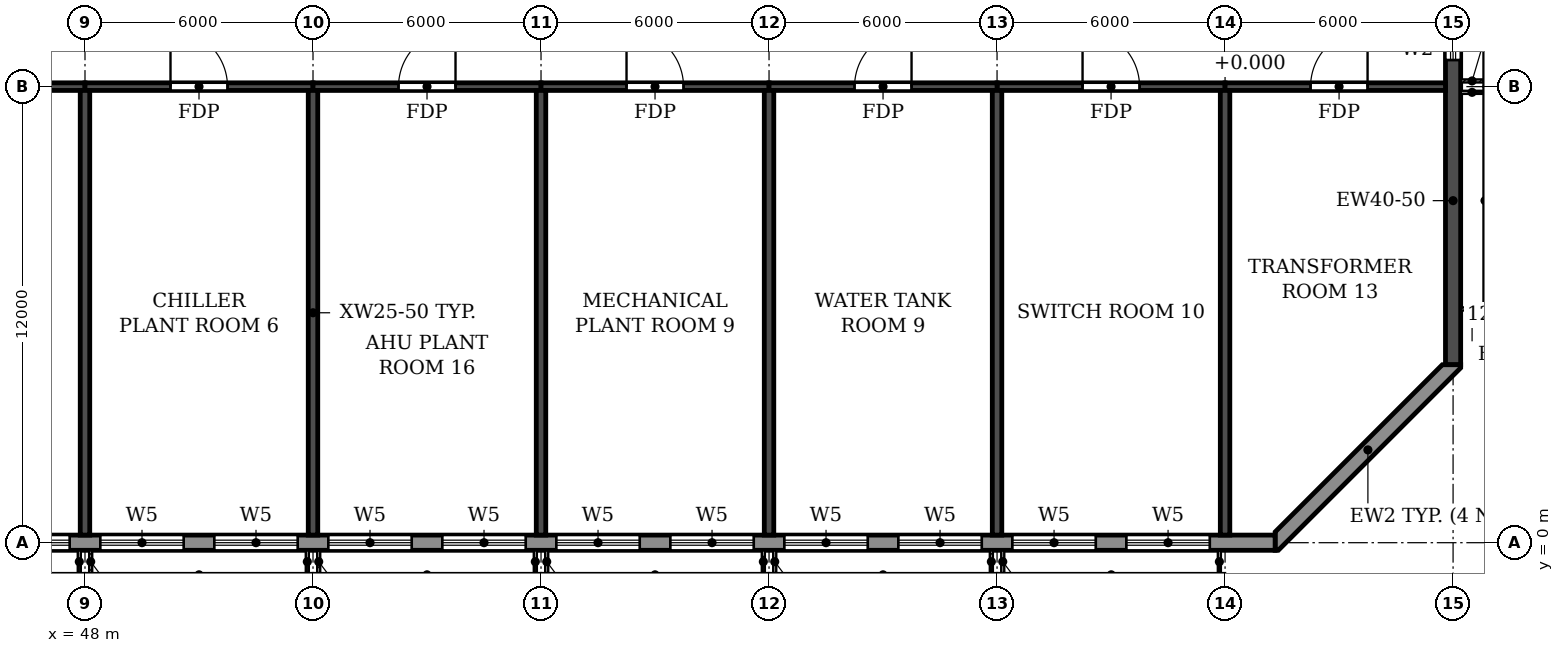
"""IFC4 building model, lengths in metres.
Left out: names, types, materials, properties, quantities, classifications, styles, units other than length and angle.
Written with IfcOpenShell. Run it as: python <this file> out.ifc"""

import sys

from ifc_helpers import new_model, si_unit, direction, frame, frame_2d, origin, place, context, subcontext, project, spatial, polyline, rectangle, outline, extrude, element, fill, save


model = new_model("IFC4")
c1 = context("Model", 3, precision=1e-05, world=origin(), true_north=direction((0.0, 1.0)))
c2 = subcontext(c1, "Body", "Model", "MODEL_VIEW")
j1 = project(units=[si_unit("LENGTHUNIT", "METRE"), si_unit("PLANEANGLEUNIT", "RADIAN")], contexts=[c1])
p1 = place(None, origin())
s1 = spatial("IfcSite", under=j1, at=p1, CompositionType="ELEMENT")
p2 = place(p1, origin())
s2 = spatial("IfcBuilding", under=s1, at=p2, CompositionType="ELEMENT")
p3 = place(p2, frame((0.0, 0.0, 267.0)))
s3 = spatial("IfcBuildingStorey", under=s2, at=p3, CompositionType="ELEMENT", Elevation=267.0)
for number, where, z_axis, x_axis in (
    (1, (48.0, 0.2, 0.0), (0.0, 0.0, 1.0), (0.0, 1.0, 0.0)),
    (2, (54.0, 0.2, 0.0), (0.0, 0.0, 1.0), (0.0, 1.0, 0.0)),
    (3, (60.0, 0.2, 0.0), (0.0, 0.0, 1.0), (0.0, 1.0, 0.0)),
    (4, (66.0, 0.2, 0.0), (0.0, 0.0, 1.0), (0.0, 1.0, 0.0)),
    (5, (72.0, 0.2, 0.0), (0.0, 0.0, 1.0), (0.0, 1.0, 0.0)),
    (6, (78.0, 0.2, 0.0), (0.0, 0.0, 1.0), (0.0, 1.0, 0.0)),
):
    element("IfcWall", number, at=place(p3, frame(where, z_axis=z_axis, x_axis=x_axis)), inside=s3, PredefinedType="SHEAR", context=c2, shape_type="SweptSolid", body=[
        extrude(rectangle(XDim=11.7, YDim=0.25, at=frame_2d((5.85, 0.0))), origin(), (0.0, 0.0, 1.0), 5.15),
    ])
p4 = place(p3, frame((84.0, 4.683, 0.0), z_axis=(0.0, 0.0, 1.0), x_axis=(0.0, 1.0, 0.0)))
e7 = element("IfcWall", 7, at=p4, inside=s3, PredefinedType="SHEAR", context=c2, shape_type="SweptSolid", body=[
    extrude(rectangle(XDim=31.834, YDim=0.4, at=frame_2d((15.917, 0.0))), origin(), (0.0, 0.0, 1.0), 5.15),
])
p5 = place(p4, frame((23.817, 0.0, 0.9)))
e8 = element("IfcOpeningElement", 8, at=p5, cuts=e7, PredefinedType="OPENING", context=c2, shape_type="SweptSolid", body=[
    extrude(rectangle(XDim=1.2, YDim=1.5, at=frame_2d((0.6, 0.75))), frame((0.0, 0.21, 0.0), z_axis=(0.0, -1.0, 0.0), x_axis=(1.0, 0.0, 0.0)), (0.0, 0.0, 1.0), 0.42),
])
p6 = place(p4, frame((8.017, 0.0, 0.9)))
e9 = element("IfcOpeningElement", 9, at=p6, cuts=e7, PredefinedType="OPENING", context=c2, shape_type="SweptSolid", body=[
    extrude(rectangle(XDim=1.2, YDim=1.5, at=frame_2d((0.6, 0.75))), frame((0.0, 0.21, 0.0), z_axis=(0.0, -1.0, 0.0), x_axis=(1.0, 0.0, 0.0)), (0.0, 0.0, 1.0), 0.42),
])
p7 = place(p4, frame((15.917, 0.0, 0.9)))
e10 = element("IfcOpeningElement", 10, at=p7, cuts=e7, PredefinedType="OPENING", context=c2, shape_type="SweptSolid", body=[
    extrude(rectangle(XDim=1.2, YDim=1.5, at=frame_2d((0.6, 0.75))), frame((0.0, 0.21, 0.0), z_axis=(0.0, -1.0, 0.0), x_axis=(1.0, 0.0, 0.0)), (0.0, 0.0, 1.0), 0.42),
])
p8 = place(p3, frame((42.0, 12.0, 0.0), z_axis=(0.0, 0.0, 1.0), x_axis=(1.0, 0.0, 0.0)))
e11 = element("IfcWall", 11, at=p8, inside=s3, PredefinedType="SHEAR", context=c2, shape_type="SweptSolid", body=[
    extrude(rectangle(XDim=6.0, YDim=0.2, at=frame_2d((3.0, 0.0))), origin(), (0.0, 0.0, 1.0), 4.55),
])
p9 = place(p8, frame((2.25, 0.0, 0.0)))
e12 = element("IfcOpeningElement", 12, at=p9, cuts=e11, PredefinedType="OPENING", context=c2, shape_type="SweptSolid", body=[
    extrude(rectangle(XDim=1.5, YDim=2.1, at=frame_2d((0.75, 1.05))), frame((0.0, 0.11, 0.0), z_axis=(0.0, -1.0, 0.0), x_axis=(1.0, 0.0, 0.0)), (0.0, 0.0, 1.0), 0.22),
])
p10 = place(p3, frame((48.0, 12.0, 0.0), z_axis=(0.0, 0.0, 1.0), x_axis=(1.0, 0.0, 0.0)))
e13 = element("IfcWall", 13, at=p10, inside=s3, PredefinedType="SHEAR", context=c2, shape_type="SweptSolid", body=[
    extrude(rectangle(XDim=6.0, YDim=0.2, at=frame_2d((3.0, 0.0))), origin(), (0.0, 0.0, 1.0), 4.55),
])
p11 = place(p10, frame((2.25, 0.0, 0.0)))
e14 = element("IfcOpeningElement", 14, at=p11, cuts=e13, PredefinedType="OPENING", context=c2, shape_type="SweptSolid", body=[
    extrude(rectangle(XDim=1.5, YDim=2.1, at=frame_2d((0.75, 1.05))), frame((0.0, 0.11, 0.0), z_axis=(0.0, -1.0, 0.0), x_axis=(1.0, 0.0, 0.0)), (0.0, 0.0, 1.0), 0.22),
])
p12 = place(p3, frame((54.0, 12.0, 0.0), z_axis=(0.0, 0.0, 1.0), x_axis=(1.0, 0.0, 0.0)))
e15 = element("IfcWall", 15, at=p12, inside=s3, PredefinedType="SHEAR", context=c2, shape_type="SweptSolid", body=[
    extrude(rectangle(XDim=6.0, YDim=0.2, at=frame_2d((3.0, 0.0))), origin(), (0.0, 0.0, 1.0), 4.55),
])
p13 = place(p12, frame((2.25, 0.0, 0.0)))
e16 = element("IfcOpeningElement", 16, at=p13, cuts=e15, PredefinedType="OPENING", context=c2, shape_type="SweptSolid", body=[
    extrude(rectangle(XDim=1.5, YDim=2.1, at=frame_2d((0.75, 1.05))), frame((0.0, 0.11, 0.0), z_axis=(0.0, -1.0, 0.0), x_axis=(1.0, 0.0, 0.0)), (0.0, 0.0, 1.0), 0.22),
])
p14 = place(p3, frame((60.0, 12.0, 0.0), z_axis=(0.0, 0.0, 1.0), x_axis=(1.0, 0.0, 0.0)))
e17 = element("IfcWall", 17, at=p14, inside=s3, PredefinedType="SHEAR", context=c2, shape_type="SweptSolid", body=[
    extrude(rectangle(XDim=6.0, YDim=0.2, at=frame_2d((3.0, 0.0))), origin(), (0.0, 0.0, 1.0), 4.55),
])
p15 = place(p14, frame((2.25, 0.0, 0.0)))
e18 = element("IfcOpeningElement", 18, at=p15, cuts=e17, PredefinedType="OPENING", context=c2, shape_type="SweptSolid", body=[
    extrude(rectangle(XDim=1.5, YDim=2.1, at=frame_2d((0.75, 1.05))), frame((0.0, 0.11, 0.0), z_axis=(0.0, -1.0, 0.0), x_axis=(1.0, 0.0, 0.0)), (0.0, 0.0, 1.0), 0.22),
])
p16 = place(p3, frame((66.0, 12.0, 0.0), z_axis=(0.0, 0.0, 1.0), x_axis=(1.0, 0.0, 0.0)))
e19 = element("IfcWall", 19, at=p16, inside=s3, PredefinedType="SHEAR", context=c2, shape_type="SweptSolid", body=[
    extrude(rectangle(XDim=6.0, YDim=0.2, at=frame_2d((3.0, 0.0))), origin(), (0.0, 0.0, 1.0), 4.55),
])
p17 = place(p16, frame((2.25, 0.0, 0.0)))
e20 = element("IfcOpeningElement", 20, at=p17, cuts=e19, PredefinedType="OPENING", context=c2, shape_type="SweptSolid", body=[
    extrude(rectangle(XDim=1.5, YDim=2.1, at=frame_2d((0.75, 1.05))), frame((0.0, 0.11, 0.0), z_axis=(0.0, -1.0, 0.0), x_axis=(1.0, 0.0, 0.0)), (0.0, 0.0, 1.0), 0.22),
])
p18 = place(p3, frame((72.0, 12.0, 0.0), z_axis=(0.0, 0.0, 1.0), x_axis=(1.0, 0.0, 0.0)))
e21 = element("IfcWall", 21, at=p18, inside=s3, PredefinedType="SHEAR", context=c2, shape_type="SweptSolid", body=[
    extrude(rectangle(XDim=6.0, YDim=0.2, at=frame_2d((3.0, 0.0))), origin(), (0.0, 0.0, 1.0), 4.55),
])
p19 = place(p18, frame((2.25, 0.0, 0.0)))
e22 = element("IfcOpeningElement", 22, at=p19, cuts=e21, PredefinedType="OPENING", context=c2, shape_type="SweptSolid", body=[
    extrude(rectangle(XDim=1.5, YDim=2.1, at=frame_2d((0.75, 1.05))), frame((0.0, 0.11, 0.0), z_axis=(0.0, -1.0, 0.0), x_axis=(1.0, 0.0, 0.0)), (0.0, 0.0, 1.0), 0.22),
])
p20 = place(p3, frame((78.0, 12.0, 0.0), z_axis=(0.0, 0.0, 1.0), x_axis=(1.0, 0.0, 0.0)))
e23 = element("IfcWall", 23, at=p20, inside=s3, PredefinedType="SHEAR", context=c2, shape_type="SweptSolid", body=[
    extrude(rectangle(XDim=5.8, YDim=0.2, at=frame_2d((2.9, 0.0))), origin(), (0.0, 0.0, 1.0), 4.55),
])
p21 = place(p20, frame((2.25, 0.0, 0.0)))
e24 = element("IfcOpeningElement", 24, at=p21, cuts=e23, PredefinedType="OPENING", context=c2, shape_type="SweptSolid", body=[
    extrude(rectangle(XDim=1.5, YDim=2.1, at=frame_2d((0.75, 1.05))), frame((0.0, 0.11, 0.0), z_axis=(0.0, -1.0, 0.0), x_axis=(1.0, 0.0, 0.0)), (0.0, 0.0, 1.0), 0.22),
])
p22 = place(p3, frame((22.683, 0.0, 0.0), z_axis=(0.0, 0.0, 1.0), x_axis=(1.0, 0.0, 0.0)))
e25 = element("IfcWall", 25, at=p22, inside=s3, PredefinedType="STANDARD", context=c2, shape_type="SweptSolid", body=[
    extrude(rectangle(XDim=56.634, YDim=0.4, at=frame_2d((28.317, 0.0))), origin(), (0.0, 0.0, 1.0), 5.15),
])
p23 = place(p22, frame((1.717, 0.0, 0.6)))
e26 = element("IfcOpeningElement", 26, at=p23, cuts=e25, PredefinedType="OPENING", context=c2, shape_type="SweptSolid", body=[
    extrude(rectangle(XDim=2.2, YDim=2.4, at=frame_2d((1.1, 1.2))), frame((0.0, 0.21, 0.0), z_axis=(0.0, -1.0, 0.0), x_axis=(1.0, 0.0, 0.0)), (0.0, 0.0, 1.0), 0.42),
])
p24 = place(p22, frame((4.717, 0.0, 0.6)))
e27 = element("IfcOpeningElement", 27, at=p24, cuts=e25, PredefinedType="OPENING", context=c2, shape_type="SweptSolid", body=[
    extrude(rectangle(XDim=2.2, YDim=2.4, at=frame_2d((1.1, 1.2))), frame((0.0, 0.21, 0.0), z_axis=(0.0, -1.0, 0.0), x_axis=(1.0, 0.0, 0.0)), (0.0, 0.0, 1.0), 0.42),
])
p25 = place(p22, frame((7.717, 0.0, 0.6)))
e28 = element("IfcOpeningElement", 28, at=p25, cuts=e25, PredefinedType="OPENING", context=c2, shape_type="SweptSolid", body=[
    extrude(rectangle(XDim=2.2, YDim=2.4, at=frame_2d((1.1, 1.2))), frame((0.0, 0.21, 0.0), z_axis=(0.0, -1.0, 0.0), x_axis=(1.0, 0.0, 0.0)), (0.0, 0.0, 1.0), 0.42),
])
p26 = place(p22, frame((10.717, 0.0, 0.6)))
e29 = element("IfcOpeningElement", 29, at=p26, cuts=e25, PredefinedType="OPENING", context=c2, shape_type="SweptSolid", body=[
    extrude(rectangle(XDim=2.2, YDim=2.4, at=frame_2d((1.1, 1.2))), frame((0.0, 0.21, 0.0), z_axis=(0.0, -1.0, 0.0), x_axis=(1.0, 0.0, 0.0)), (0.0, 0.0, 1.0), 0.42),
])
p27 = place(p22, frame((13.717, 0.0, 0.6)))
e30 = element("IfcOpeningElement", 30, at=p27, cuts=e25, PredefinedType="OPENING", context=c2, shape_type="SweptSolid", body=[
    extrude(rectangle(XDim=2.2, YDim=2.4, at=frame_2d((1.1, 1.2))), frame((0.0, 0.21, 0.0), z_axis=(0.0, -1.0, 0.0), x_axis=(1.0, 0.0, 0.0)), (0.0, 0.0, 1.0), 0.42),
])
p28 = place(p22, frame((16.717, 0.0, 0.6)))
e31 = element("IfcOpeningElement", 31, at=p28, cuts=e25, PredefinedType="OPENING", context=c2, shape_type="SweptSolid", body=[
    extrude(rectangle(XDim=2.2, YDim=2.4, at=frame_2d((1.1, 1.2))), frame((0.0, 0.21, 0.0), z_axis=(0.0, -1.0, 0.0), x_axis=(1.0, 0.0, 0.0)), (0.0, 0.0, 1.0), 0.42),
])
p29 = place(p22, frame((19.717, 0.0, 0.6)))
e32 = element("IfcOpeningElement", 32, at=p29, cuts=e25, PredefinedType="OPENING", context=c2, shape_type="SweptSolid", body=[
    extrude(rectangle(XDim=2.2, YDim=2.4, at=frame_2d((1.1, 1.2))), frame((0.0, 0.21, 0.0), z_axis=(0.0, -1.0, 0.0), x_axis=(1.0, 0.0, 0.0)), (0.0, 0.0, 1.0), 0.42),
])
p30 = place(p22, frame((22.717, 0.0, 0.6)))
e33 = element("IfcOpeningElement", 33, at=p30, cuts=e25, PredefinedType="OPENING", context=c2, shape_type="SweptSolid", body=[
    extrude(rectangle(XDim=2.2, YDim=2.4, at=frame_2d((1.1, 1.2))), frame((0.0, 0.21, 0.0), z_axis=(0.0, -1.0, 0.0), x_axis=(1.0, 0.0, 0.0)), (0.0, 0.0, 1.0), 0.42),
])
p31 = place(p22, frame((25.717, 0.0, 0.6)))
e34 = element("IfcOpeningElement", 34, at=p31, cuts=e25, PredefinedType="OPENING", context=c2, shape_type="SweptSolid", body=[
    extrude(rectangle(XDim=2.2, YDim=2.4, at=frame_2d((1.1, 1.2))), frame((0.0, 0.21, 0.0), z_axis=(0.0, -1.0, 0.0), x_axis=(1.0, 0.0, 0.0)), (0.0, 0.0, 1.0), 0.42),
])
p32 = place(p22, frame((28.717, 0.0, 0.6)))
e35 = element("IfcOpeningElement", 35, at=p32, cuts=e25, PredefinedType="OPENING", context=c2, shape_type="SweptSolid", body=[
    extrude(rectangle(XDim=2.2, YDim=2.4, at=frame_2d((1.1, 1.2))), frame((0.0, 0.21, 0.0), z_axis=(0.0, -1.0, 0.0), x_axis=(1.0, 0.0, 0.0)), (0.0, 0.0, 1.0), 0.42),
])
p33 = place(p22, frame((31.717, 0.0, 0.6)))
e36 = element("IfcOpeningElement", 36, at=p33, cuts=e25, PredefinedType="OPENING", context=c2, shape_type="SweptSolid", body=[
    extrude(rectangle(XDim=2.2, YDim=2.4, at=frame_2d((1.1, 1.2))), frame((0.0, 0.21, 0.0), z_axis=(0.0, -1.0, 0.0), x_axis=(1.0, 0.0, 0.0)), (0.0, 0.0, 1.0), 0.42),
])
p34 = place(p22, frame((34.717, 0.0, 0.6)))
e37 = element("IfcOpeningElement", 37, at=p34, cuts=e25, PredefinedType="OPENING", context=c2, shape_type="SweptSolid", body=[
    extrude(rectangle(XDim=2.2, YDim=2.4, at=frame_2d((1.1, 1.2))), frame((0.0, 0.21, 0.0), z_axis=(0.0, -1.0, 0.0), x_axis=(1.0, 0.0, 0.0)), (0.0, 0.0, 1.0), 0.42),
])
p35 = place(p22, frame((37.717, 0.0, 0.6)))
e38 = element("IfcOpeningElement", 38, at=p35, cuts=e25, PredefinedType="OPENING", context=c2, shape_type="SweptSolid", body=[
    extrude(rectangle(XDim=2.2, YDim=2.4, at=frame_2d((1.1, 1.2))), frame((0.0, 0.21, 0.0), z_axis=(0.0, -1.0, 0.0), x_axis=(1.0, 0.0, 0.0)), (0.0, 0.0, 1.0), 0.42),
])
p36 = place(p22, frame((40.717, 0.0, 0.6)))
e39 = element("IfcOpeningElement", 39, at=p36, cuts=e25, PredefinedType="OPENING", context=c2, shape_type="SweptSolid", body=[
    extrude(rectangle(XDim=2.2, YDim=2.4, at=frame_2d((1.1, 1.2))), frame((0.0, 0.21, 0.0), z_axis=(0.0, -1.0, 0.0), x_axis=(1.0, 0.0, 0.0)), (0.0, 0.0, 1.0), 0.42),
])
p37 = place(p22, frame((43.717, 0.0, 0.6)))
e40 = element("IfcOpeningElement", 40, at=p37, cuts=e25, PredefinedType="OPENING", context=c2, shape_type="SweptSolid", body=[
    extrude(rectangle(XDim=2.2, YDim=2.4, at=frame_2d((1.1, 1.2))), frame((0.0, 0.21, 0.0), z_axis=(0.0, -1.0, 0.0), x_axis=(1.0, 0.0, 0.0)), (0.0, 0.0, 1.0), 0.42),
])
p38 = place(p22, frame((46.717, 0.0, 0.6)))
e41 = element("IfcOpeningElement", 41, at=p38, cuts=e25, PredefinedType="OPENING", context=c2, shape_type="SweptSolid", body=[
    extrude(rectangle(XDim=2.2, YDim=2.4, at=frame_2d((1.1, 1.2))), frame((0.0, 0.21, 0.0), z_axis=(0.0, -1.0, 0.0), x_axis=(1.0, 0.0, 0.0)), (0.0, 0.0, 1.0), 0.42),
])
p39 = place(p22, frame((49.717, 0.0, 0.6)))
e42 = element("IfcOpeningElement", 42, at=p39, cuts=e25, PredefinedType="OPENING", context=c2, shape_type="SweptSolid", body=[
    extrude(rectangle(XDim=2.2, YDim=2.4, at=frame_2d((1.1, 1.2))), frame((0.0, 0.21, 0.0), z_axis=(0.0, -1.0, 0.0), x_axis=(1.0, 0.0, 0.0)), (0.0, 0.0, 1.0), 0.42),
])
p40 = place(p22, frame((52.717, 0.0, 0.6)))
e43 = element("IfcOpeningElement", 43, at=p40, cuts=e25, PredefinedType="OPENING", context=c2, shape_type="SweptSolid", body=[
    extrude(rectangle(XDim=2.2, YDim=2.4, at=frame_2d((1.1, 1.2))), frame((0.0, 0.21, 0.0), z_axis=(0.0, -1.0, 0.0), x_axis=(1.0, 0.0, 0.0)), (0.0, 0.0, 1.0), 0.42),
])
p41 = place(p3, origin())
e44 = element("IfcWall", 44, at=p41, inside=s3, PredefinedType="STANDARD", context=c2, shape_type="SweptSolid", body=[
    extrude(outline(polyline([(79.317, -0.2), (79.4, -0.2), (84.2, 4.6), (84.2, 4.683), (83.717, 4.683), (79.317, 0.283), (79.317, -0.2)])), origin(), (0.0, 0.0, 1.0), 5.15),
])
p42 = place(p30, origin())
e45 = element("IfcWindow", 45, at=p42, inside=s3, PartitioningType="TRIPLE_PANEL_HORIZONTAL", PredefinedType="WINDOW", context=c2, shape_type="SweptSolid", body=[
    extrude(rectangle(XDim=2.2, YDim=2.4, at=frame_2d((1.1, 1.2))), frame((0.0, 0.03, 0.0), z_axis=(0.0, -1.0, 0.0), x_axis=(1.0, 0.0, 0.0)), (0.0, 0.0, 1.0), 0.06),
])
fill(e33, e45)
p43 = place(p31, origin())
e46 = element("IfcWindow", 46, at=p43, inside=s3, PartitioningType="TRIPLE_PANEL_HORIZONTAL", PredefinedType="WINDOW", context=c2, shape_type="SweptSolid", body=[
    extrude(rectangle(XDim=2.2, YDim=2.4, at=frame_2d((1.1, 1.2))), frame((0.0, 0.03, 0.0), z_axis=(0.0, -1.0, 0.0), x_axis=(1.0, 0.0, 0.0)), (0.0, 0.0, 1.0), 0.06),
])
fill(e34, e46)
p44 = place(p32, origin())
e47 = element("IfcWindow", 47, at=p44, inside=s3, PartitioningType="TRIPLE_PANEL_HORIZONTAL", PredefinedType="WINDOW", context=c2, shape_type="SweptSolid", body=[
    extrude(rectangle(XDim=2.2, YDim=2.4, at=frame_2d((1.1, 1.2))), frame((0.0, 0.03, 0.0), z_axis=(0.0, -1.0, 0.0), x_axis=(1.0, 0.0, 0.0)), (0.0, 0.0, 1.0), 0.06),
])
fill(e35, e47)
p45 = place(p33, origin())
e48 = element("IfcWindow", 48, at=p45, inside=s3, PartitioningType="TRIPLE_PANEL_HORIZONTAL", PredefinedType="WINDOW", context=c2, shape_type="SweptSolid", body=[
    extrude(rectangle(XDim=2.2, YDim=2.4, at=frame_2d((1.1, 1.2))), frame((0.0, 0.03, 0.0), z_axis=(0.0, -1.0, 0.0), x_axis=(1.0, 0.0, 0.0)), (0.0, 0.0, 1.0), 0.06),
])
fill(e36, e48)
p46 = place(p34, origin())
e49 = element("IfcWindow", 49, at=p46, inside=s3, PartitioningType="TRIPLE_PANEL_HORIZONTAL", PredefinedType="WINDOW", context=c2, shape_type="SweptSolid", body=[
    extrude(rectangle(XDim=2.2, YDim=2.4, at=frame_2d((1.1, 1.2))), frame((0.0, 0.03, 0.0), z_axis=(0.0, -1.0, 0.0), x_axis=(1.0, 0.0, 0.0)), (0.0, 0.0, 1.0), 0.06),
])
fill(e37, e49)
p47 = place(p35, origin())
e50 = element("IfcWindow", 50, at=p47, inside=s3, PartitioningType="TRIPLE_PANEL_HORIZONTAL", PredefinedType="WINDOW", context=c2, shape_type="SweptSolid", body=[
    extrude(rectangle(XDim=2.2, YDim=2.4, at=frame_2d((1.1, 1.2))), frame((0.0, 0.03, 0.0), z_axis=(0.0, -1.0, 0.0), x_axis=(1.0, 0.0, 0.0)), (0.0, 0.0, 1.0), 0.06),
])
fill(e38, e50)
p48 = place(p36, origin())
e51 = element("IfcWindow", 51, at=p48, inside=s3, PartitioningType="TRIPLE_PANEL_HORIZONTAL", PredefinedType="WINDOW", context=c2, shape_type="SweptSolid", body=[
    extrude(rectangle(XDim=2.2, YDim=2.4, at=frame_2d((1.1, 1.2))), frame((0.0, 0.03, 0.0), z_axis=(0.0, -1.0, 0.0), x_axis=(1.0, 0.0, 0.0)), (0.0, 0.0, 1.0), 0.06),
])
fill(e39, e51)
p49 = place(p37, origin())
e52 = element("IfcWindow", 52, at=p49, inside=s3, PartitioningType="TRIPLE_PANEL_HORIZONTAL", PredefinedType="WINDOW", context=c2, shape_type="SweptSolid", body=[
    extrude(rectangle(XDim=2.2, YDim=2.4, at=frame_2d((1.1, 1.2))), frame((0.0, 0.03, 0.0), z_axis=(0.0, -1.0, 0.0), x_axis=(1.0, 0.0, 0.0)), (0.0, 0.0, 1.0), 0.06),
])
fill(e40, e52)
p50 = place(p38, origin())
e53 = element("IfcWindow", 53, at=p50, inside=s3, PartitioningType="TRIPLE_PANEL_HORIZONTAL", PredefinedType="WINDOW", context=c2, shape_type="SweptSolid", body=[
    extrude(rectangle(XDim=2.2, YDim=2.4, at=frame_2d((1.1, 1.2))), frame((0.0, 0.03, 0.0), z_axis=(0.0, -1.0, 0.0), x_axis=(1.0, 0.0, 0.0)), (0.0, 0.0, 1.0), 0.06),
])
fill(e41, e53)
p51 = place(p39, origin())
e54 = element("IfcWindow", 54, at=p51, inside=s3, PartitioningType="TRIPLE_PANEL_HORIZONTAL", PredefinedType="WINDOW", context=c2, shape_type="SweptSolid", body=[
    extrude(rectangle(XDim=2.2, YDim=2.4, at=frame_2d((1.1, 1.2))), frame((0.0, 0.03, 0.0), z_axis=(0.0, -1.0, 0.0), x_axis=(1.0, 0.0, 0.0)), (0.0, 0.0, 1.0), 0.06),
])
fill(e42, e54)
p52 = place(p40, origin())
e55 = element("IfcWindow", 55, at=p52, inside=s3, PartitioningType="TRIPLE_PANEL_HORIZONTAL", PredefinedType="WINDOW", context=c2, shape_type="SweptSolid", body=[
    extrude(rectangle(XDim=2.2, YDim=2.4, at=frame_2d((1.1, 1.2))), frame((0.0, 0.03, 0.0), z_axis=(0.0, -1.0, 0.0), x_axis=(1.0, 0.0, 0.0)), (0.0, 0.0, 1.0), 0.06),
])
fill(e43, e55)
p53 = place(p6, origin())
e56 = element("IfcWindow", 56, at=p53, inside=s3, PartitioningType="SINGLE_PANEL", PredefinedType="WINDOW", context=c2, shape_type="SweptSolid", body=[
    extrude(rectangle(XDim=1.2, YDim=1.5, at=frame_2d((0.6, 0.75))), frame((0.0, 0.03, 0.0), z_axis=(0.0, -1.0, 0.0), x_axis=(1.0, 0.0, 0.0)), (0.0, 0.0, 1.0), 0.06),
])
fill(e9, e56)
p54 = place(p11, origin())
e57 = element("IfcDoor", 57, at=p54, inside=s3, OperationType="DOUBLE_DOOR_SINGLE_SWING", PredefinedType="DOOR", context=c2, shape_type="SweptSolid", body=[
    extrude(rectangle(XDim=1.5, YDim=2.1, at=frame_2d((0.75, 1.05))), frame((0.0, 0.025, 0.0), z_axis=(0.0, -1.0, 0.0), x_axis=(1.0, 0.0, 0.0)), (0.0, 0.0, 1.0), 0.05),
])
fill(e14, e57)
p55 = place(p13, origin())
e58 = element("IfcDoor", 58, at=p55, inside=s3, OperationType="DOUBLE_DOOR_SINGLE_SWING", PredefinedType="DOOR", context=c2, shape_type="SweptSolid", body=[
    extrude(rectangle(XDim=1.5, YDim=2.1, at=frame_2d((0.75, 1.05))), frame((0.0, 0.025, 0.0), z_axis=(0.0, -1.0, 0.0), x_axis=(1.0, 0.0, 0.0)), (0.0, 0.0, 1.0), 0.05),
])
fill(e16, e58)
p56 = place(p15, origin())
e59 = element("IfcDoor", 59, at=p56, inside=s3, OperationType="DOUBLE_DOOR_SINGLE_SWING", PredefinedType="DOOR", context=c2, shape_type="SweptSolid", body=[
    extrude(rectangle(XDim=1.5, YDim=2.1, at=frame_2d((0.75, 1.05))), frame((0.0, 0.025, 0.0), z_axis=(0.0, -1.0, 0.0), x_axis=(1.0, 0.0, 0.0)), (0.0, 0.0, 1.0), 0.05),
])
fill(e18, e59)
p57 = place(p17, origin())
e60 = element("IfcDoor", 60, at=p57, inside=s3, OperationType="DOUBLE_DOOR_SINGLE_SWING", PredefinedType="DOOR", context=c2, shape_type="SweptSolid", body=[
    extrude(rectangle(XDim=1.5, YDim=2.1, at=frame_2d((0.75, 1.05))), frame((0.0, 0.025, 0.0), z_axis=(0.0, -1.0, 0.0), x_axis=(1.0, 0.0, 0.0)), (0.0, 0.0, 1.0), 0.05),
])
fill(e20, e60)
p58 = place(p19, origin())
e61 = element("IfcDoor", 61, at=p58, inside=s3, OperationType="DOUBLE_DOOR_SINGLE_SWING", PredefinedType="DOOR", context=c2, shape_type="SweptSolid", body=[
    extrude(rectangle(XDim=1.5, YDim=2.1, at=frame_2d((0.75, 1.05))), frame((0.0, 0.025, 0.0), z_axis=(0.0, -1.0, 0.0), x_axis=(1.0, 0.0, 0.0)), (0.0, 0.0, 1.0), 0.05),
])
fill(e22, e61)
p59 = place(p21, origin())
e62 = element("IfcDoor", 62, at=p59, inside=s3, OperationType="DOUBLE_DOOR_SINGLE_SWING", PredefinedType="DOOR", context=c2, shape_type="SweptSolid", body=[
    extrude(rectangle(XDim=1.5, YDim=2.1, at=frame_2d((0.75, 1.05))), frame((0.0, 0.025, 0.0), z_axis=(0.0, -1.0, 0.0), x_axis=(1.0, 0.0, 0.0)), (0.0, 0.0, 1.0), 0.05),
])
fill(e24, e62)
save(model, sys.argv[1])
